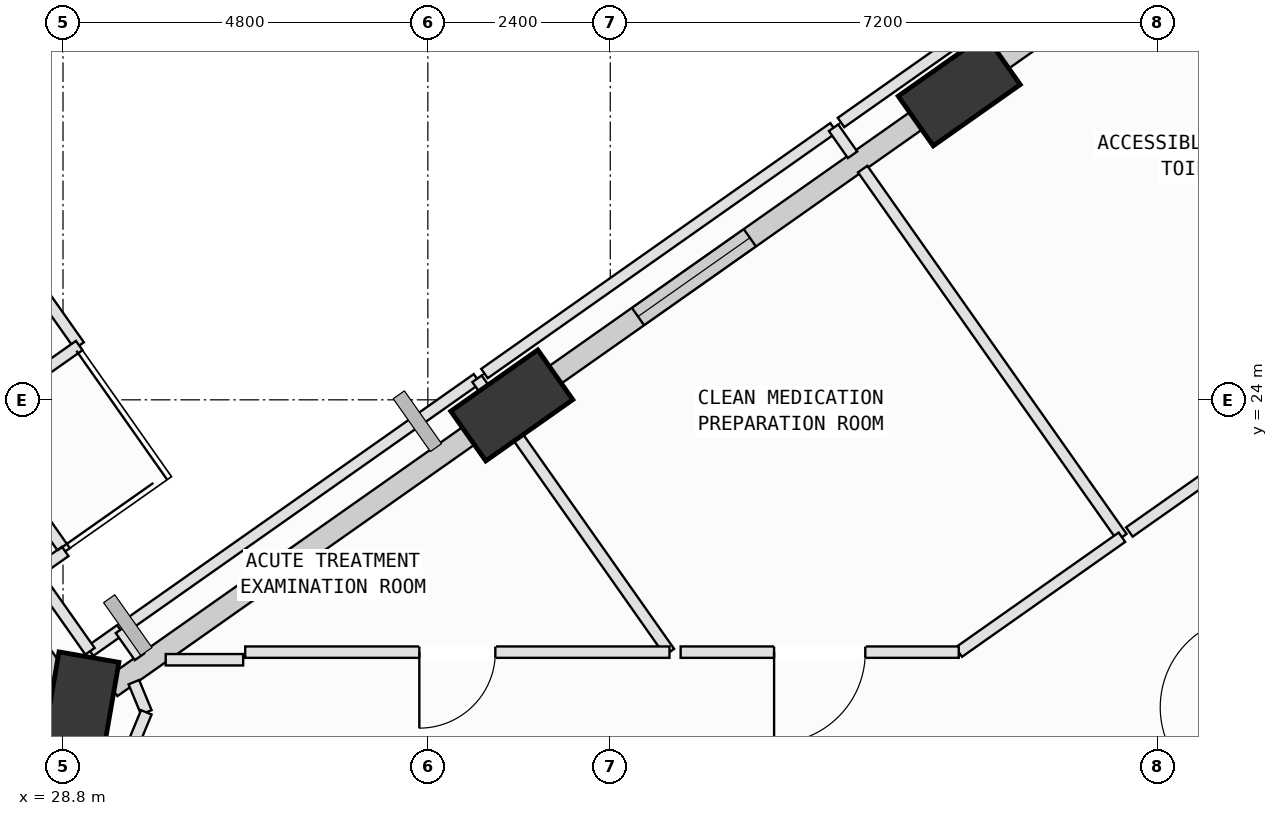
"""IFC4 building model, lengths in metres.
Left out: names, types, materials, properties, quantities, classifications, styles, units other than length and angle.
Written with IfcOpenShell. Run it as: python <this file> out.ifc"""

import sys

from ifc_helpers import new_model, si_unit, direction, frame, frame_2d, origin, origin_2d, place, context, subcontext, project, spatial, rectangle, extrude, element, fill, save


model = new_model("IFC4")
c1 = context("Model", 3, precision=1e-05, world=origin(), true_north=direction((0.0, 1.0)))
c2 = subcontext(c1, "Body", "Model", "MODEL_VIEW")
j1 = project(units=[si_unit("LENGTHUNIT", "METRE"), si_unit("PLANEANGLEUNIT", "RADIAN")], contexts=[c1])
p1 = place(None, origin())
s1 = spatial("IfcSite", under=j1, at=p1, CompositionType="ELEMENT")
p2 = place(p1, origin())
s2 = spatial("IfcBuilding", under=s1, at=p2, CompositionType="ELEMENT")
p3 = place(p2, frame((0.0, 0.0, 173.8)))
s3 = spatial("IfcBuildingStorey", under=s2, at=p3, CompositionType="ELEMENT", Elevation=173.8)
p4 = place(p3, frame((40.591, 28.072, 0.002), z_axis=(-0.013799535315, 0.028820268446, 0.999489352095), x_axis=(-0.488965468419, -0.872109136637, 0.018396317223)))
e1 = element("IfcColumn", 1, at=p4, inside=s3, PredefinedType="COLUMN", context=c2, shape_type="SweptSolid", body=[
    extrude(rectangle(XDim=1.4, YDim=0.8, at=origin_2d()), origin(), (0.0, 0.0, 1.0), 3.998),
])
p5 = place(p3, frame((34.704, 23.927, 0.002), z_axis=(0.003543223601, 0.004581754657, 0.999983226405), x_axis=(-0.998991423752, 0.044777405776, 0.003334546835)))
e2 = element("IfcColumn", 2, at=p5, inside=s3, PredefinedType="COLUMN", context=c2, shape_type="SweptSolid", body=[
    extrude(rectangle(XDim=1.4, YDim=0.8, at=origin_2d()), origin(), (0.0, 0.0, 1.0), 3.996),
])
p6 = place(p3, frame((29.022, 19.925, 0.002), z_axis=(0.020335525631, -0.018808834518, 0.999616273448), x_axis=(-0.606869387949, 0.794332861658, 0.027291955989)))
e3 = element("IfcColumn", 3, at=p6, inside=s3, PredefinedType="COLUMN", context=c2, shape_type="SweptSolid", body=[
    extrude(rectangle(XDim=1.4, YDim=0.8, at=origin_2d()), origin(), (0.0, 0.0, 1.0), 3.998),
])
p7 = place(p3, frame((41.002, 28.361, 0.0), z_axis=(0.0, 0.0, 1.0), x_axis=(0.817646454024, 0.575720658151, 0.0)))
e4 = element("IfcWall", 4, at=p7, inside=s3, PredefinedType="SOLIDWALL", context=c2, shape_type="SweptSolid", body=[
    extrude(rectangle(XDim=6.227, YDim=0.28, at=frame_2d((3.113, 0.0))), origin(), (0.0, 0.0, 1.0), 3.065),
])
p8 = place(p7, frame((0.996, 0.0, 0.75)))
e5 = element("IfcOpeningElement", 5, at=p8, cuts=e4, PredefinedType="OPENING", context=c2, shape_type="SweptSolid", body=[
    extrude(rectangle(XDim=1.4, YDim=1.85, at=frame_2d((0.7, 0.925))), frame((0.0, 0.15, 0.0), z_axis=(0.0, -1.0, 0.0), x_axis=(1.0, 0.0, 0.0)), (0.0, 0.0, 1.0), 0.3),
])
p9 = place(p3, frame((35.119, 24.219, 0.0), z_axis=(0.0, 0.0, 1.0), x_axis=(0.817635088969, 0.575736798622, 0.0)))
e6 = element("IfcWall", 6, at=p9, inside=s3, PredefinedType="SOLIDWALL", context=c2, shape_type="SweptSolid", body=[
    extrude(rectangle(XDim=6.211, YDim=0.28, at=frame_2d((3.105, 0.0))), origin(), (0.0, 0.0, 1.0), 3.265),
])
p10 = place(p9, frame((1.524, 0.0, 0.75)))
e7 = element("IfcOpeningElement", 7, at=p10, cuts=e6, PredefinedType="OPENING", context=c2, shape_type="SweptSolid", body=[
    extrude(rectangle(XDim=1.8, YDim=2.05, at=frame_2d((0.9, 1.025))), frame((0.0, 0.15, 0.0), z_axis=(0.0, -1.0, 0.0), x_axis=(1.0, 0.0, 0.0)), (0.0, 0.0, 1.0), 0.3),
])
p11 = place(p3, frame((29.435, 20.216, 0.0), z_axis=(0.0, 0.0, 1.0), x_axis=(0.817631441068, 0.575741979169, 0.0)))
e8 = element("IfcWall", 8, at=p11, inside=s3, PredefinedType="SOLIDWALL", context=c2, shape_type="SweptSolid", body=[
    extrude(rectangle(XDim=5.96, YDim=0.28, at=frame_2d((2.98, 0.0))), origin(), (0.0, 0.0, 1.0), 3.265),
])
p12 = place(p3, frame((28.767, 20.287, 0.0), z_axis=(0.0, 0.0, 1.0), x_axis=(-0.575707206598, 0.817655925357, 0.0)))
e9 = element("IfcWall", 9, at=p12, inside=s3, PredefinedType="SOLIDWALL", context=c2, shape_type="SweptSolid", body=[
    extrude(rectangle(XDim=6.76, YDim=0.28, at=frame_2d((3.38, 0.0))), origin(), (0.0, 0.0, 1.0), 3.265),
])
p13 = place(p3, frame((42.171, 18.36, 0.0), z_axis=(0.0, 0.0, 1.0), x_axis=(0.81769852076, 0.575646705147, 0.0)))
e10 = element("IfcWall", 10, at=p13, inside=s3, PredefinedType="PARTITIONING", context=c2, shape_type="SweptSolid", body=[
    extrude(rectangle(XDim=4.339, YDim=0.15, at=frame_2d((2.169, 0.0))), origin(), (0.0, 0.0, 1.0), 3.78),
])
p14 = place(p13, frame((1.57, 0.0, 0.0)))
e11 = element("IfcOpeningElement", 11, at=p14, cuts=e10, PredefinedType="OPENING", context=c2, shape_type="SweptSolid", body=[
    extrude(rectangle(XDim=1.2, YDim=2.15, at=frame_2d((0.6, 1.075))), frame((0.0, 0.085, 0.0), z_axis=(0.0, -1.0, 0.0), x_axis=(1.0, 0.0, 0.0)), (0.0, 0.0, 1.0), 0.17),
])
p15 = place(p3, frame((29.155, 20.692, 0.0), z_axis=(0.0, 0.0, 1.0), x_axis=(0.817023152975, 0.576604862539, 0.0)))
e12 = element("IfcWall", 12, at=p15, inside=s3, PredefinedType="PARTITIONING", context=c2, shape_type="SweptSolid", body=[
    extrude(rectangle(XDim=0.49, YDim=0.15, at=frame_2d((0.245, 0.0))), origin(), (0.0, 0.0, 1.0), 3.78),
])
p16 = place(p3, frame((29.555, 20.974, 0.0), z_axis=(0.0, 0.0, 1.0), x_axis=(0.575979061459, -0.817464446176, 0.0)))
e13 = element("IfcWall", 13, at=p16, inside=s3, PredefinedType="PARTITIONING", context=c2, shape_type="SweptSolid", body=[
    extrude(rectangle(XDim=0.436, YDim=0.15, at=frame_2d((0.218, 0.0))), origin(), (0.0, 0.0, 1.0), 3.78),
])
p17 = place(p3, frame((29.732, 20.285, 0.0), z_axis=(0.0, 0.0, 1.0), x_axis=(0.381950141161, -0.924182930846, 0.0)))
e14 = element("IfcWall", 14, at=p17, inside=s3, PredefinedType="PARTITIONING", context=c2, shape_type="SweptSolid", body=[
    extrude(rectangle(XDim=0.429, YDim=0.15, at=frame_2d((0.215, 0.0))), origin(), (0.0, 0.0, 1.0), 3.78),
])
p18 = place(p3, frame((29.896, 19.888, 0.0), z_axis=(0.0, 0.0, 1.0), x_axis=(-0.382115291723, -0.924114659462, 0.0)))
e15 = element("IfcWall", 15, at=p18, inside=s3, PredefinedType="PARTITIONING", context=c2, shape_type="SweptSolid", body=[
    extrude(rectangle(XDim=0.638, YDim=0.15, at=frame_2d((0.319, 0.0))), origin(), (0.0, 0.0, 1.0), 3.78),
])
p19 = place(p3, frame((27.915, 23.304, 0.0), z_axis=(0.0, 0.0, 1.0), x_axis=(0.575451525788, -0.817835889081, 0.0)))
e16 = element("IfcWall", 16, at=p19, inside=s3, PredefinedType="PARTITIONING", context=c2, shape_type="SweptSolid", body=[
    extrude(rectangle(XDim=1.588, YDim=0.15, at=frame_2d((0.794, 0.0))), origin(), (0.0, 0.0, 1.0), 3.78),
])
p20 = place(p3, frame((28.829, 22.005, 0.0), z_axis=(0.0, 0.0, 1.0), x_axis=(-0.817423724009, -0.57603685249, 0.0)))
e17 = element("IfcWall", 17, at=p20, inside=s3, PredefinedType="PARTITIONING", context=c2, shape_type="SweptSolid", body=[
    extrude(rectangle(XDim=0.49, YDim=0.15, at=frame_2d((0.245, 0.0))), origin(), (0.0, 0.0, 1.0), 3.78),
])
p21 = place(p3, frame((28.429, 21.723, 0.0), z_axis=(0.0, 0.0, 1.0), x_axis=(0.575785910644, -0.817600504589, 0.0)))
e18 = element("IfcWall", 18, at=p21, inside=s3, PredefinedType="PARTITIONING", context=c2, shape_type="SweptSolid", body=[
    extrude(rectangle(XDim=1.261, YDim=0.15, at=frame_2d((0.63, 0.0))), origin(), (0.0, 0.0, 1.0), 3.78),
])
p22 = place(p3, frame((31.17, 20.58, 0.0), z_axis=(0.0, 0.0, 1.0), x_axis=(-1.0, 0.0, 0.0)))
e19 = element("IfcWall", 19, at=p22, inside=s3, PredefinedType="PARTITIONING", context=c2, shape_type="SweptSolid", body=[
    extrude(rectangle(XDim=1.019, YDim=0.15, at=frame_2d((0.51, 0.0))), origin(), (0.0, 0.0, 1.0), 3.78),
])
p23 = place(p3, frame((29.653, 21.043, 0.0), z_axis=(0.0, 0.0, 1.0), x_axis=(0.817695812803, 0.575650551746, 0.0)))
e20 = element("IfcWall", 20, at=p23, inside=s3, PredefinedType="PARTITIONING", context=c2, shape_type="SweptSolid", body=[
    extrude(rectangle(XDim=5.618, YDim=0.15, at=frame_2d((2.809, 0.0))), origin(), (0.0, 0.0, 1.0), 3.78),
])
p24 = place(p3, frame((34.247, 24.277, 0.0), z_axis=(0.0, 0.0, 1.0), x_axis=(0.575591010878, -0.8177377258, 0.0)))
e21 = element("IfcWall", 21, at=p24, inside=s3, PredefinedType="PARTITIONING", context=c2, shape_type="SweptSolid", body=[
    extrude(rectangle(XDim=4.399, YDim=0.15, at=frame_2d((2.199, 0.0))), origin(), (0.0, 0.0, 1.0), 3.78),
])
p25 = place(p3, frame((36.779, 20.68, 0.0), z_axis=(0.0, 0.0, 1.0), x_axis=(-1.0, 0.0, 0.0)))
e22 = element("IfcWall", 22, at=p25, inside=s3, PredefinedType="PARTITIONING", context=c2, shape_type="SweptSolid", body=[
    extrude(rectangle(XDim=5.582, YDim=0.15, at=frame_2d((2.791, 0.0))), origin(), (0.0, 0.0, 1.0), 3.415),
])
p26 = place(p25, frame((2.291, 0.0, 0.0)))
e23 = element("IfcOpeningElement", 23, at=p26, cuts=e22, PredefinedType="OPENING", context=c2, shape_type="SweptSolid", body=[
    extrude(rectangle(XDim=1.0, YDim=2.12, at=frame_2d((0.5, 1.06))), frame((0.0, 0.085, 0.0), z_axis=(0.0, -1.0, 0.0), x_axis=(1.0, 0.0, 0.0)), (0.0, 0.0, 1.0), 0.17),
])
p27 = place(p3, frame((34.345, 24.346, 0.0), z_axis=(0.0, 0.0, 1.0), x_axis=(0.817638200952, 0.5757323791, 0.0)))
e24 = element("IfcWall", 24, at=p27, inside=s3, PredefinedType="PARTITIONING", context=c2, shape_type="SweptSolid", body=[
    extrude(rectangle(XDim=5.617, YDim=0.15, at=frame_2d((2.809, 0.0))), origin(), (0.0, 0.0, 1.0), 3.78),
])
p28 = place(p3, frame((38.938, 27.58, 0.0), z_axis=(0.0, 0.0, 1.0), x_axis=(0.574742398175, -0.818334391151, 0.0)))
e25 = element("IfcWall", 25, at=p28, inside=s3, PredefinedType="PARTITIONING", context=c2, shape_type="SweptSolid", body=[
    extrude(rectangle(XDim=0.435, YDim=0.15, at=frame_2d((0.218, 0.0))), origin(), (0.0, 0.0, 1.0), 3.78),
])
p29 = place(p3, frame((39.321, 27.036, 0.0), z_axis=(0.0, 0.0, 1.0), x_axis=(0.575736327122, -0.817635420974, 0.0)))
e26 = element("IfcWall", 26, at=p29, inside=s3, PredefinedType="PARTITIONING", context=c2, shape_type="SweptSolid", body=[
    extrude(rectangle(XDim=5.924, YDim=0.15, at=frame_2d((2.962, 0.0))), origin(), (0.0, 0.0, 1.0), 3.78),
])
p30 = place(p3, frame((42.732, 22.192, 0.0), z_axis=(0.0, 0.0, 1.0), x_axis=(-0.81760379004, -0.575781245363, 0.0)))
e27 = element("IfcWall", 27, at=p30, inside=s3, PredefinedType="PARTITIONING", context=c2, shape_type="SweptSolid", body=[
    extrude(rectangle(XDim=2.626, YDim=0.15, at=frame_2d((1.313, 0.0))), origin(), (0.0, 0.0, 1.0), 3.78),
])
p31 = place(p3, frame((40.585, 20.68, 0.0), z_axis=(0.0, 0.0, 1.0), x_axis=(-1.0, 0.0, 0.0)))
e28 = element("IfcWall", 28, at=p31, inside=s3, PredefinedType="PARTITIONING", context=c2, shape_type="SweptSolid", body=[
    extrude(rectangle(XDim=3.659, YDim=0.15, at=frame_2d((1.83, 0.0))), origin(), (0.0, 0.0, 1.0), 3.78),
])
p32 = place(p31, frame((1.229, 0.0, 0.0)))
e29 = element("IfcOpeningElement", 29, at=p32, cuts=e28, PredefinedType="OPENING", context=c2, shape_type="SweptSolid", body=[
    extrude(rectangle(XDim=1.2, YDim=2.15, at=frame_2d((0.6, 1.075))), frame((0.0, 0.085, 0.0), z_axis=(0.0, -1.0, 0.0), x_axis=(1.0, 0.0, 0.0)), (0.0, 0.0, 1.0), 0.17),
])
p33 = place(p3, frame((47.423, 25.495, 0.0), z_axis=(0.0, 0.0, 1.0), x_axis=(-0.817638200952, -0.5757323791, 0.0)))
e30 = element("IfcWall", 30, at=p33, inside=s3, PredefinedType="PARTITIONING", context=c2, shape_type="SweptSolid", body=[
    extrude(rectangle(XDim=5.617, YDim=0.15, at=frame_2d((2.809, 0.0))), origin(), (0.0, 0.0, 1.0), 3.78),
])
p34 = place(p33, frame((2.349, 0.0, 0.0)))
e31 = element("IfcOpeningElement", 31, at=p34, cuts=e30, PredefinedType="OPENING", context=c2, shape_type="SweptSolid", body=[
    extrude(rectangle(XDim=0.92, YDim=2.1, at=frame_2d((0.46, 1.05))), frame((0.0, 0.085, 0.0), z_axis=(0.0, -1.0, 0.0), x_axis=(1.0, 0.0, 0.0)), (0.0, 0.0, 1.0), 0.17),
])
p35 = place(p3, frame((39.036, 27.649, 0.0), z_axis=(0.0, 0.0, 1.0), x_axis=(0.817638200952, 0.5757323791, 0.0)))
e32 = element("IfcWall", 32, at=p35, inside=s3, PredefinedType="PARTITIONING", context=c2, shape_type="SweptSolid", body=[
    extrude(rectangle(XDim=5.617, YDim=0.15, at=frame_2d((2.809, 0.0))), origin(), (0.0, 0.0, 1.0), 3.265),
])
p36 = place(p3, frame((26.082, 28.876, 0.0), z_axis=(0.0, 0.0, 1.0), x_axis=(0.575780877136, -0.817604049357, 0.0)))
e33 = element("IfcWall", 33, at=p36, inside=s3, PredefinedType="PARTITIONING", context=c2, shape_type="SweptSolid", body=[
    extrude(rectangle(XDim=5.09, YDim=0.15, at=frame_2d((2.545, 0.0))), origin(), (0.0, 0.0, 1.0), 3.78),
])
p37 = place(p3, frame((29.013, 24.714, 0.0), z_axis=(0.0, 0.0, 1.0), x_axis=(-0.817354310267, -0.576135341293, 0.0)))
e34 = element("IfcWall", 34, at=p37, inside=s3, PredefinedType="PARTITIONING", context=c2, shape_type="SweptSolid", body=[
    extrude(rectangle(XDim=2.59, YDim=0.15, at=frame_2d((1.295, 0.0))), origin(), (0.0, 0.0, 1.0), 3.78),
])
p38 = place(p10, origin())
e35 = element("IfcWindow", 35, at=p38, inside=s3, PartitioningType="SINGLE_PANEL", PredefinedType="WINDOW", context=c2, shape_type="SweptSolid", body=[
    extrude(rectangle(XDim=1.8, YDim=2.05, at=frame_2d((0.9, 1.025))), frame((0.0, 0.03, 0.0), z_axis=(0.0, -1.0, 0.0), x_axis=(1.0, 0.0, 0.0)), (0.0, 0.0, 1.0), 0.06),
])
fill(e7, e35)
p39 = place(p14, origin())
e36 = element("IfcDoor", 36, at=p39, inside=s3, OperationType="SINGLE_SWING_RIGHT", PredefinedType="DOOR", context=c2, shape_type="SweptSolid", body=[
    extrude(rectangle(XDim=1.2, YDim=2.15, at=frame_2d((0.6, 1.075))), frame((0.0, 0.025, 0.0), z_axis=(0.0, -1.0, 0.0), x_axis=(1.0, 0.0, 0.0)), (0.0, 0.0, 1.0), 0.05),
])
fill(e11, e36)
p40 = place(p26, origin())
e37 = element("IfcDoor", 37, at=p40, inside=s3, OperationType="SINGLE_SWING_RIGHT", PredefinedType="DOOR", context=c2, shape_type="SweptSolid", body=[
    extrude(rectangle(XDim=1.0, YDim=2.12, at=frame_2d((0.5, 1.06))), frame((0.0, 0.025, 0.0), z_axis=(0.0, -1.0, 0.0), x_axis=(1.0, 0.0, 0.0)), (0.0, 0.0, 1.0), 0.05),
])
fill(e23, e37)
p41 = place(p32, origin())
e38 = element("IfcDoor", 38, at=p41, inside=s3, OperationType="SINGLE_SWING_RIGHT", PredefinedType="DOOR", context=c2, shape_type="SweptSolid", body=[
    extrude(rectangle(XDim=1.2, YDim=2.15, at=frame_2d((0.6, 1.075))), frame((0.0, 0.025, 0.0), z_axis=(0.0, -1.0, 0.0), x_axis=(1.0, 0.0, 0.0)), (0.0, 0.0, 1.0), 0.05),
])
fill(e29, e38)
save(model, sys.argv[1])
